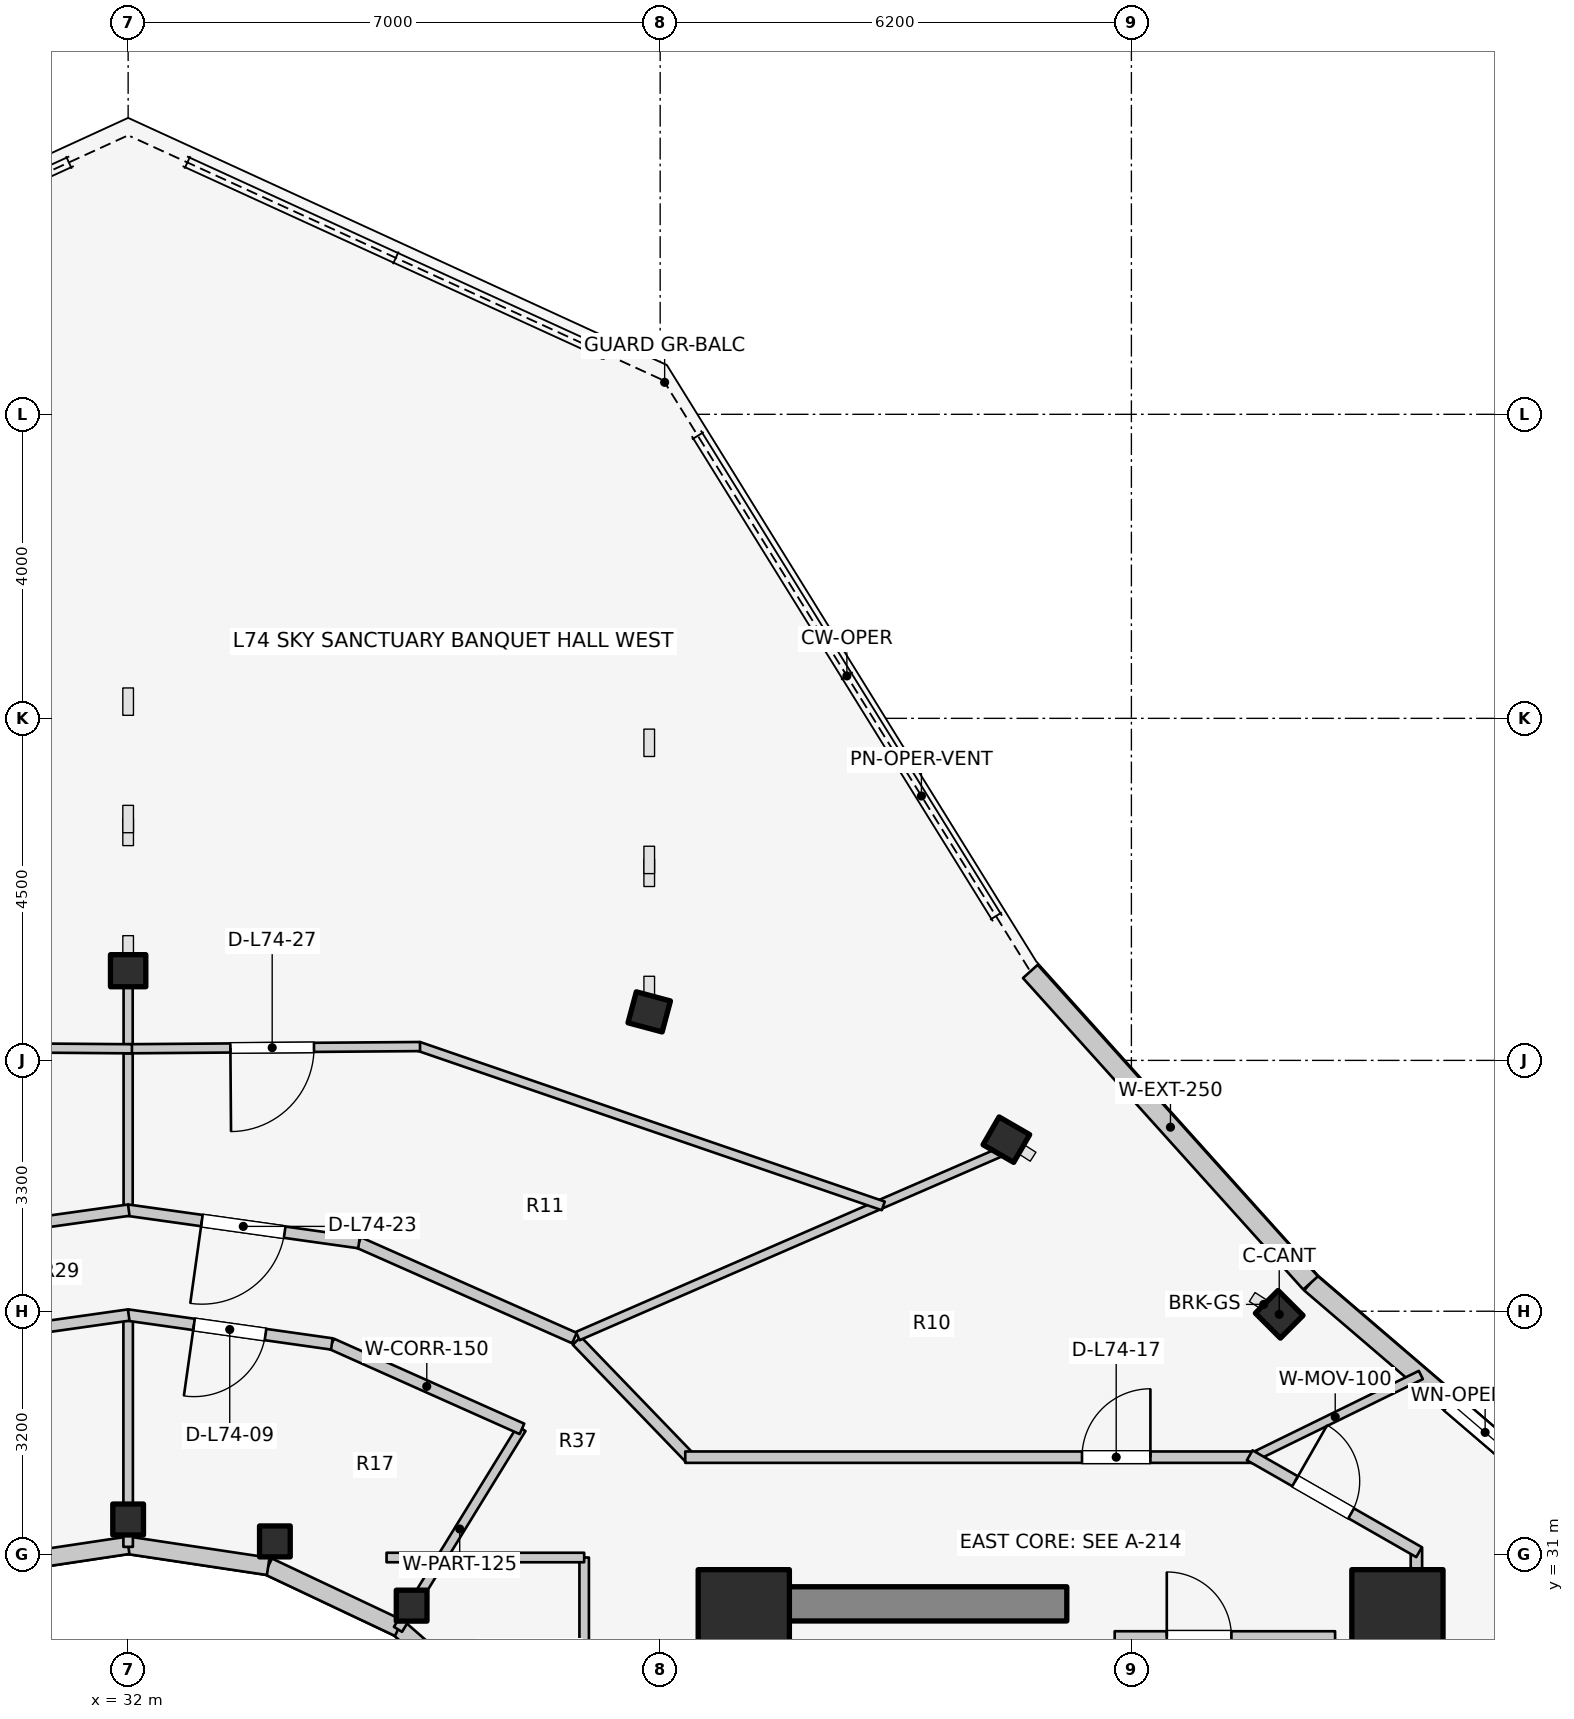
"""IFC4 building model, lengths in metres.
Left out: names, types, materials, properties, quantities, classifications, styles, units other than length and angle.
Written with IfcOpenShell. Run it as: python <this file> out.ifc"""

import sys

from ifc_helpers import new_model, si_unit, direction, frame, frame_2d, origin, origin_2d, place, context, subcontext, project, spatial, rectangle, i_section, extrude, element, fill, save


model = new_model("IFC4")
c1 = context("Model", 3, precision=1e-05, world=origin(), true_north=direction((0.0, 1.0)))
c2 = subcontext(c1, "Body", "Model", "MODEL_VIEW")
j1 = project(units=[si_unit("LENGTHUNIT", "METRE"), si_unit("PLANEANGLEUNIT", "RADIAN")], contexts=[c1])
p1 = place(None, origin())
s1 = spatial("IfcSite", under=j1, at=p1, CompositionType="ELEMENT")
p2 = place(p1, origin())
s2 = spatial("IfcBuilding", under=s1, at=p2, CompositionType="ELEMENT")
p3 = place(p2, frame((0.0, 0.0, 242.4)))
s3 = spatial("IfcBuildingStorey", under=s2, at=p3, CompositionType="ELEMENT", Elevation=242.4)
p4 = place(p3, frame((39.85, 30.35, 0.0), z_axis=(0.0, 0.0, 1.0), x_axis=(1.0, 0.0, 0.0)))
e1 = element("IfcWall", 1, at=p4, inside=s3, PredefinedType="SHEAR", context=c2, shape_type="SweptSolid", body=[
    extrude(rectangle(XDim=4.5, YDim=0.45, at=frame_2d((2.25, 0.0))), origin(), (0.0, 0.0, 1.0), 3.6),
])
for number, where, z_axis, x_axis in (
    (2, (48.7, 30.2, 0.0), (0.0, 0.0, 1.0), (1.0, 0.0, 0.0)),
    (3, (40.1, 30.2, 0.0), (0.0, 0.0, 1.0), (1.0, 0.0, 0.0)),
):
    element("IfcColumn", number, at=place(p3, frame(where, z_axis=z_axis, x_axis=x_axis)), inside=s3, PredefinedType="COLUMN", context=c2, shape_type="SweptSolid", body=[
        extrude(rectangle(XDim=1.2, YDim=1.2, at=origin_2d()), origin(), (0.0, 0.0, 1.0), 3.6),
    ])
p5 = place(p3, frame((47.145, 34.159, 0.0), z_axis=(0.0, 0.0, 1.0), x_axis=(0.707106781187, 0.707106781187, 0.0)))
e4 = element("IfcColumn", 4, at=p5, inside=s3, PredefinedType="COLUMN", context=c2, shape_type="SweptSolid", body=[
    extrude(i_section(OverallWidth=0.422, OverallDepth=0.465, WebThickness=0.045, FlangeThickness=0.073, FilletRadius=0.025, at=origin_2d()), origin(), (0.0, 0.0, 1.0), 3.6),
])
p6 = place(p3, frame((35.73, 30.327, 0.0), z_axis=(0.0, 0.0, 1.0), x_axis=(1.0, 0.0, 0.0)))
e5 = element("IfcColumn", 5, at=p6, inside=s3, PredefinedType="COLUMN", context=c2, shape_type="SweptSolid", body=[
    extrude(i_section(OverallWidth=0.404, OverallDepth=0.407, WebThickness=0.027, FlangeThickness=0.044, FilletRadius=0.025, at=origin_2d()), origin(), (0.0, 0.0, 1.0), 3.6),
])
p7 = place(p3, frame((43.555, 36.457, 0.0), z_axis=(0.0, 0.0, 1.0), x_axis=(0.5, 0.866025403784, 0.0)))
e6 = element("IfcColumn", 6, at=p7, inside=s3, PredefinedType="COLUMN", context=c2, shape_type="SweptSolid", body=[
    extrude(i_section(OverallWidth=0.422, OverallDepth=0.465, WebThickness=0.045, FlangeThickness=0.073, FilletRadius=0.025, at=origin_2d()), origin(), (0.0, 0.0, 1.0), 3.6),
])
p8 = place(p3, frame((33.931, 31.172, 0.0), z_axis=(0.0, 0.0, 1.0), x_axis=(1.0, 0.0, 0.0)))
e7 = element("IfcColumn", 7, at=p8, inside=s3, PredefinedType="COLUMN", context=c2, shape_type="SweptSolid", body=[
    extrude(i_section(OverallWidth=0.404, OverallDepth=0.407, WebThickness=0.027, FlangeThickness=0.044, FilletRadius=0.025, at=origin_2d()), origin(), (0.0, 0.0, 1.0), 3.6),
])
p9 = place(p3, frame((38.856, 38.138, 0.0), z_axis=(0.0, 0.0, 1.0), x_axis=(0.258819045103, 0.965925826289, 0.0)))
e8 = element("IfcColumn", 8, at=p9, inside=s3, PredefinedType="COLUMN", context=c2, shape_type="SweptSolid", body=[
    extrude(i_section(OverallWidth=0.422, OverallDepth=0.465, WebThickness=0.045, FlangeThickness=0.073, FilletRadius=0.025, at=origin_2d()), origin(), (0.0, 0.0, 1.0), 3.6),
])
p10 = place(p3, frame((32.0, 31.46, 0.0), z_axis=(0.0, 0.0, 1.0), x_axis=(1.0, 0.0, 0.0)))
e9 = element("IfcColumn", 9, at=p10, inside=s3, PredefinedType="COLUMN", context=c2, shape_type="SweptSolid", body=[
    extrude(i_section(OverallWidth=0.404, OverallDepth=0.407, WebThickness=0.027, FlangeThickness=0.044, FilletRadius=0.025, at=origin_2d()), origin(), (0.0, 0.0, 1.0), 3.6),
])
p11 = place(p3, frame((32.0, 38.68, 0.0), z_axis=(0.0, 0.0, 1.0), x_axis=(0.0, 1.0, 0.0)))
e10 = element("IfcColumn", 10, at=p11, inside=s3, PredefinedType="COLUMN", context=c2, shape_type="SweptSolid", body=[
    extrude(i_section(OverallWidth=0.422, OverallDepth=0.465, WebThickness=0.045, FlangeThickness=0.073, FilletRadius=0.025, at=origin_2d()), origin(), (0.0, 0.0, 1.0), 3.6),
])
p12 = place(p3, frame((37.035, 28.742, 0.0), z_axis=(0.0, 0.0, 1.0), x_axis=(-0.752576694707, 0.658504607869, 0.0)))
e11 = element("IfcWall", 11, at=p12, inside=s3, PredefinedType="STANDARD", context=c2, shape_type="SweptSolid", body=[
    extrude(rectangle(XDim=1.959, YDim=0.23, at=frame_2d((0.98, 0.0))), origin(), (0.0, 0.0, 1.0), 2.6),
])
p13 = place(p3, frame((35.56, 30.032, 0.0), z_axis=(0.0, 0.0, 1.0), x_axis=(-0.904179699603, 0.427152280606, 0.0)))
e12 = element("IfcWall", 12, at=p13, inside=s3, PredefinedType="STANDARD", context=c2, shape_type="SweptSolid", body=[
    extrude(rectangle(XDim=1.899, YDim=0.23, at=frame_2d((0.95, 0.0))), origin(), (0.0, 0.0, 1.0), 2.6),
])
for number, where, z_axis, x_axis in (
    (13, (33.843, 30.843, 0.0), (0.0, 0.0, 1.0), (-0.989, 0.149, 0.0)),
    (14, (32.0, 31.12, 0.0), (0.0, 0.0, 1.0), (-0.989, -0.149, 0.0)),
):
    element("IfcWall", number, at=place(p3, frame(where, z_axis=z_axis, x_axis=x_axis)), inside=s3, PredefinedType="STANDARD", context=c2, shape_type="SweptSolid", body=[
        extrude(rectangle(XDim=1.864, YDim=0.23, at=frame_2d((0.932, 0.0))), origin(), (0.0, 0.0, 1.0), 2.6),
    ])
p14 = place(p3, frame((50.761, 31.829, 0.0), z_axis=(0.0, 0.0, 1.0), x_axis=(-0.759587504333, 0.650405122413, 0.0)))
e15 = element("IfcWall", 15, at=p14, inside=s3, PredefinedType="STANDARD", context=c2, shape_type="SweptSolid", body=[
    extrude(rectangle(XDim=4.217, YDim=0.26, at=frame_2d((2.109, 0.0))), origin(), (0.0, 0.0, 1.0), 3.29),
])
p15 = place(p14, frame((0.594, 0.0, 0.75)))
e16 = element("IfcOpeningElement", 16, at=p15, cuts=e15, PredefinedType="OPENING", context=c2, shape_type="SweptSolid", body=[
    extrude(rectangle(XDim=1.2, YDim=1.5, at=frame_2d((0.6, 0.75))), frame((0.0, 0.14, 0.0), z_axis=(0.0, -1.0, 0.0), x_axis=(1.0, 0.0, 0.0)), (0.0, 0.0, 1.0), 0.28),
])
p16 = place(p3, frame((47.558, 34.572, 0.0), z_axis=(0.0, 0.0, 1.0), x_axis=(-0.668903560134, 0.743349196031, 0.0)))
e17 = element("IfcWall", 17, at=p16, inside=s3, PredefinedType="STANDARD", context=c2, shape_type="SweptSolid", body=[
    extrude(rectangle(XDim=5.513, YDim=0.26, at=frame_2d((2.756, 0.0))), origin(), (0.0, 0.0, 1.0), 3.29),
])
p17 = place(p3, frame((44.98, 29.92, 0.0), z_axis=(0.0, 0.0, 1.0), x_axis=(1.0, 0.0, 0.0)))
e18 = element("IfcWall", 18, at=p17, inside=s3, PredefinedType="PLUMBINGWALL", context=c2, shape_type="SweptSolid", body=[
    extrude(rectangle(XDim=2.9, YDim=0.14, at=frame_2d((1.45, 0.0))), origin(), (0.0, 0.0, 1.0), 3.295),
])
p18 = place(p17, frame((0.686, 0.0, 0.0)))
e19 = element("IfcOpeningElement", 19, at=p18, cuts=e18, PredefinedType="OPENING", context=c2, shape_type="SweptSolid", body=[
    extrude(rectangle(XDim=0.85, YDim=2.05, at=frame_2d((0.425, 1.025))), frame((0.0, 0.08, 0.0), z_axis=(0.0, -1.0, 0.0), x_axis=(1.0, 0.0, 0.0)), (0.0, 0.0, 1.0), 0.16),
])
p19 = place(p3, frame((35.55, 30.015, 0.0), z_axis=(0.0, 0.0, 1.0), x_axis=(0.523992004803, 0.851723182086, 0.0)))
e20 = element("IfcWall", 20, at=p19, inside=s3, PredefinedType="PARTITIONING", context=c2, shape_type="SweptSolid", body=[
    extrude(rectangle(XDim=3.101, YDim=0.125, at=frame_2d((1.551, 0.0))), origin(), (0.0, 0.0, 1.0), 2.672),
])
p20 = place(p3, frame((32.0, 31.1, 0.0), z_axis=(0.0, 0.0, 1.0), x_axis=(0.0, 1.0, 0.0)))
e21 = element("IfcWall", 21, at=p20, inside=s3, PredefinedType="PARTITIONING", context=c2, shape_type="SweptSolid", body=[
    extrude(rectangle(XDim=3.05, YDim=0.125, at=frame_2d((1.525, 0.0))), origin(), (0.0, 0.0, 1.0), 2.672),
])
p21 = place(p3, frame((37.181, 32.652, 0.0), z_axis=(0.0, 0.0, 1.0), x_axis=(-0.913120130558, 0.407690602257, 0.0)))
e22 = element("IfcWall", 22, at=p21, inside=s3, PredefinedType="PARTITIONING", context=c2, shape_type="SweptSolid", body=[
    extrude(rectangle(XDim=2.743, YDim=0.15, at=frame_2d((1.371, 0.0))), origin(), (0.0, 0.0, 1.0), 2.823),
])
p22 = place(p3, frame((34.68, 33.77, 0.0), z_axis=(0.0, 0.0, 1.0), x_axis=(-0.990132151456, 0.140136799779, 0.0)))
e23 = element("IfcWall", 23, at=p22, inside=s3, PredefinedType="PARTITIONING", context=c2, shape_type="SweptSolid", body=[
    extrude(rectangle(XDim=2.714, YDim=0.15, at=frame_2d((1.357, 0.0))), origin(), (0.0, 0.0, 1.0), 2.823),
])
p23 = place(p22, frame((0.882, 0.0, 0.0)))
e24 = element("IfcOpeningElement", 24, at=p23, cuts=e23, PredefinedType="OPENING", context=c2, shape_type="SweptSolid", body=[
    extrude(rectangle(XDim=0.95, YDim=2.1, at=frame_2d((0.475, 1.05))), frame((0.0, 0.085, 0.0), z_axis=(0.0, -1.0, 0.0), x_axis=(1.0, 0.0, 0.0)), (0.0, 0.0, 1.0), 0.17),
])
p24 = place(p3, frame((32.007, 34.15, 0.0), z_axis=(0.0, 0.0, 1.0), x_axis=(-0.990132151456, -0.140136799779, 0.0)))
e25 = element("IfcWall", 25, at=p24, inside=s3, PredefinedType="PARTITIONING", context=c2, shape_type="SweptSolid", body=[
    extrude(rectangle(XDim=2.714, YDim=0.15, at=frame_2d((1.357, 0.0))), origin(), (0.0, 0.0, 1.0), 2.823),
])
p25 = place(p3, frame((38.0, 25.8, 0.0), z_axis=(0.0, 0.0, 1.0), x_axis=(0.0, 1.0, 0.0)))
e26 = element("IfcWall", 26, at=p25, inside=s3, PredefinedType="PARTITIONING", context=c2, shape_type="SweptSolid", body=[
    extrude(rectangle(XDim=5.16, YDim=0.125, at=frame_2d((2.58, 0.0))), origin(), (0.0, 0.0, 1.0), 2.672),
])
p26 = place(p3, frame((35.4, 30.96, 0.0), z_axis=(0.0, 0.0, 1.0), x_axis=(1.0, 0.0, 0.0)))
e27 = element("IfcWall", 27, at=p26, inside=s3, PredefinedType="PARTITIONING", context=c2, shape_type="SweptSolid", body=[
    extrude(rectangle(XDim=2.6, YDim=0.125, at=frame_2d((1.3, 0.0))), origin(), (0.0, 0.0, 1.0), 2.816),
])
p27 = place(p3, frame((48.95, 29.8, 0.0), z_axis=(0.0, 0.0, 1.0), x_axis=(0.0, 1.0, 0.0)))
e28 = element("IfcWall", 28, at=p27, inside=s3, PredefinedType="PARTITIONING", context=c2, shape_type="SweptSolid", body=[
    extrude(rectangle(XDim=1.29, YDim=0.15, at=frame_2d((0.645, 0.0))), origin(), (0.0, 0.0, 1.0), 3.295),
])
p28 = place(p3, frame((46.755, 32.258, 0.0), z_axis=(0.0, 0.0, 1.0), x_axis=(0.898152129572, 0.439684832745, 0.0)))
e29 = element("IfcWall", 29, at=p28, inside=s3, PredefinedType="MOVABLE", context=c2, shape_type="SweptSolid", body=[
    extrude(rectangle(XDim=2.509, YDim=0.12, at=frame_2d((1.254, 0.0))), origin(), (0.0, 0.0, 1.0), 2.66),
])
p29 = place(p3, frame((37.903, 33.812, 0.0), z_axis=(0.0, 0.0, 1.0), x_axis=(0.694032962553, -0.719943224768, 0.0)))
e30 = element("IfcWall", 30, at=p29, inside=s3, PredefinedType="PARTITIONING", context=c2, shape_type="SweptSolid", body=[
    extrude(rectangle(XDim=2.158, YDim=0.15, at=frame_2d((1.079, 0.0))), origin(), (0.0, 0.0, 1.0), 2.816),
])
p30 = place(p3, frame((39.33, 32.28, 0.0), z_axis=(0.0, 0.0, 1.0), x_axis=(1.0, 0.0, 0.0)))
e31 = element("IfcWall", 31, at=p30, inside=s3, PredefinedType="PARTITIONING", context=c2, shape_type="SweptSolid", body=[
    extrude(rectangle(XDim=7.52, YDim=0.15, at=frame_2d((3.76, 0.0))), origin(), (0.0, 0.0, 1.0), 2.816),
])
p31 = place(p30, frame((5.22, 0.0, 0.0)))
e32 = element("IfcOpeningElement", 32, at=p31, cuts=e31, PredefinedType="OPENING", context=c2, shape_type="SweptSolid", body=[
    extrude(rectangle(XDim=0.9, YDim=2.1, at=frame_2d((0.45, 1.05))), frame((0.0, 0.085, 0.0), z_axis=(0.0, -1.0, 0.0), x_axis=(1.0, 0.0, 0.0)), (0.0, 0.0, 1.0), 0.17),
])
p32 = place(p3, frame((46.757, 32.305, 0.0), z_axis=(0.0, 0.0, 1.0), x_axis=(0.867991349648, -0.496579315857, 0.0)))
e33 = element("IfcWall", 33, at=p32, inside=s3, PredefinedType="PARTITIONING", context=c2, shape_type="SweptSolid", body=[
    extrude(rectangle(XDim=2.567, YDim=0.15, at=frame_2d((1.283, 0.0))), origin(), (0.0, 0.0, 1.0), 2.66),
])
p33 = place(p32, frame((0.688, 0.0, 0.0)))
e34 = element("IfcOpeningElement", 34, at=p33, cuts=e33, PredefinedType="OPENING", context=c2, shape_type="SweptSolid", body=[
    extrude(rectangle(XDim=0.85, YDim=2.05, at=frame_2d((0.425, 1.025))), frame((0.0, 0.085, 0.0), z_axis=(0.0, -1.0, 0.0), x_axis=(1.0, 0.0, 0.0)), (0.0, 0.0, 1.0), 0.17),
])
p34 = place(p3, frame((37.915, 33.873, 0.0), z_axis=(0.0, 0.0, 1.0), x_axis=(0.916946661839, 0.399009798554, 0.0)))
e35 = element("IfcWall", 35, at=p34, inside=s3, PredefinedType="MOVABLE", context=c2, shape_type="SweptSolid", body=[
    extrude(rectangle(XDim=6.042, YDim=0.12, at=frame_2d((3.021, 0.0))), origin(), (0.0, 0.0, 1.0), 2.66),
])
p35 = place(p3, frame((32.0, 35.585, 0.0), z_axis=(0.0, 0.0, 1.0), x_axis=(0.0, 1.0, 0.0)))
e36 = element("IfcWall", 36, at=p35, inside=s3, PredefinedType="MOVABLE", context=c2, shape_type="SweptSolid", body=[
    extrude(rectangle(XDim=2.895, YDim=0.12, at=frame_2d((1.448, 0.0))), origin(), (0.0, 0.0, 1.0), 2.66),
])
p36 = place(p3, frame((37.872, 33.847, 0.0), z_axis=(0.0, 0.0, 1.0), x_axis=(-0.914384748819, 0.404846305563, 0.0)))
e37 = element("IfcWall", 37, at=p36, inside=s3, PredefinedType="PARTITIONING", context=c2, shape_type="SweptSolid", body=[
    extrude(rectangle(XDim=3.104, YDim=0.15, at=frame_2d((1.552, 0.0))), origin(), (0.0, 0.0, 1.0), 2.823),
])
p37 = place(p3, frame((35.038, 35.103, 0.0), z_axis=(0.0, 0.0, 1.0), x_axis=(-0.990295701983, 0.138976338396, 0.0)))
e38 = element("IfcWall", 38, at=p37, inside=s3, PredefinedType="PARTITIONING", context=c2, shape_type="SweptSolid", body=[
    extrude(rectangle(XDim=3.076, YDim=0.15, at=frame_2d((1.538, 0.0))), origin(), (0.0, 0.0, 1.0), 2.823),
])
p38 = place(p37, frame((0.988, 0.0, 0.0)))
e39 = element("IfcOpeningElement", 39, at=p38, cuts=e38, PredefinedType="OPENING", context=c2, shape_type="SweptSolid", body=[
    extrude(rectangle(XDim=1.1, YDim=2.1, at=frame_2d((0.55, 1.05))), frame((0.0, 0.085, 0.0), z_axis=(0.0, -1.0, 0.0), x_axis=(1.0, 0.0, 0.0)), (0.0, 0.0, 1.0), 0.17),
])
p39 = place(p3, frame((32.008, 35.53, 0.0), z_axis=(0.0, 0.0, 1.0), x_axis=(-0.990295701983, -0.138976338396, 0.0)))
e40 = element("IfcWall", 40, at=p39, inside=s3, PredefinedType="PARTITIONING", context=c2, shape_type="SweptSolid", body=[
    extrude(rectangle(XDim=3.076, YDim=0.15, at=frame_2d((1.538, 0.0))), origin(), (0.0, 0.0, 1.0), 2.823),
])
p40 = place(p3, frame((41.935, 35.586, 0.0), z_axis=(0.0, 0.0, 1.0), x_axis=(-0.945789589552, 0.324780005995, 0.0)))
e41 = element("IfcWall", 41, at=p40, inside=s3, PredefinedType="MOVABLE", context=c2, shape_type="SweptSolid", body=[
    extrude(rectangle(XDim=6.465, YDim=0.12, at=frame_2d((3.232, 0.0))), origin(), (0.0, 0.0, 1.0), 2.823),
])
p41 = place(p3, frame((35.841, 37.682, 0.0), z_axis=(0.0, 0.0, 1.0), x_axis=(-0.999971175398, -0.007592652624, 0.0)))
e42 = element("IfcWall", 42, at=p41, inside=s3, PredefinedType="MOVABLE", context=c2, shape_type="SweptSolid", body=[
    extrude(rectangle(XDim=3.891, YDim=0.12, at=frame_2d((1.945, 0.0))), origin(), (0.0, 0.0, 1.0), 2.823),
])
p42 = place(p41, frame((1.395, 0.0, 0.0)))
e43 = element("IfcOpeningElement", 43, at=p42, cuts=e42, PredefinedType="OPENING", context=c2, shape_type="SweptSolid", body=[
    extrude(rectangle(XDim=1.1, YDim=2.1, at=frame_2d((0.55, 1.05))), frame((0.0, 0.07, 0.0), z_axis=(0.0, -1.0, 0.0), x_axis=(1.0, 0.0, 0.0)), (0.0, 0.0, 1.0), 0.14),
])
p43 = place(p3, frame((32.05, 37.653, 0.0), z_axis=(0.0, 0.0, 1.0), x_axis=(-0.999971175398, 0.007592652624, 0.0)))
e44 = element("IfcWall", 44, at=p43, inside=s3, PredefinedType="MOVABLE", context=c2, shape_type="SweptSolid", body=[
    extrude(rectangle(XDim=3.891, YDim=0.12, at=frame_2d((1.945, 0.0))), origin(), (0.0, 0.0, 1.0), 2.823),
])
p44 = place(p15, origin())
e45 = element("IfcWindow", 45, at=p44, inside=s3, PartitioningType="SINGLE_PANEL", PredefinedType="WINDOW", context=c2, shape_type="SweptSolid", body=[
    extrude(rectangle(XDim=1.2, YDim=1.5, at=frame_2d((0.6, 0.75))), frame((0.0, 0.03, 0.0), z_axis=(0.0, -1.0, 0.0), x_axis=(1.0, 0.0, 0.0)), (0.0, 0.0, 1.0), 0.06),
])
fill(e16, e45)
p45 = place(p18, origin())
e46 = element("IfcDoor", 46, at=p45, inside=s3, OperationType="SINGLE_SWING_LEFT", PredefinedType="DOOR", context=c2, shape_type="SweptSolid", body=[
    extrude(rectangle(XDim=0.85, YDim=2.05, at=frame_2d((0.425, 1.025))), frame((0.0, 0.025, 0.0), z_axis=(0.0, -1.0, 0.0), x_axis=(1.0, 0.0, 0.0)), (0.0, 0.0, 1.0), 0.05),
])
fill(e19, e46)
p46 = place(p23, origin())
e47 = element("IfcDoor", 47, at=p46, inside=s3, OperationType="SINGLE_SWING_RIGHT", PredefinedType="DOOR", context=c2, shape_type="SweptSolid", body=[
    extrude(rectangle(XDim=0.95, YDim=2.1, at=frame_2d((0.475, 1.05))), frame((0.0, 0.025, 0.0), z_axis=(0.0, -1.0, 0.0), x_axis=(1.0, 0.0, 0.0)), (0.0, 0.0, 1.0), 0.05),
])
fill(e24, e47)
p47 = place(p31, origin())
e48 = element("IfcDoor", 48, at=p47, inside=s3, OperationType="SINGLE_SWING_RIGHT", PredefinedType="DOOR", context=c2, shape_type="SweptSolid", body=[
    extrude(rectangle(XDim=0.9, YDim=2.1, at=frame_2d((0.45, 1.05))), frame((0.0, 0.025, 0.0), z_axis=(0.0, -1.0, 0.0), x_axis=(1.0, 0.0, 0.0)), (0.0, 0.0, 1.0), 0.05),
])
fill(e32, e48)
p48 = place(p33, origin())
e49 = element("IfcDoor", 49, at=p48, inside=s3, OperationType="SINGLE_SWING_LEFT", PredefinedType="DOOR", context=c2, shape_type="SweptSolid", body=[
    extrude(rectangle(XDim=0.85, YDim=2.05, at=frame_2d((0.425, 1.025))), frame((0.0, 0.025, 0.0), z_axis=(0.0, -1.0, 0.0), x_axis=(1.0, 0.0, 0.0)), (0.0, 0.0, 1.0), 0.05),
])
fill(e34, e49)
p49 = place(p38, origin())
e50 = element("IfcDoor", 50, at=p49, inside=s3, OperationType="SINGLE_SWING_RIGHT", PredefinedType="DOOR", context=c2, shape_type="SweptSolid", body=[
    extrude(rectangle(XDim=1.1, YDim=2.1, at=frame_2d((0.55, 1.05))), frame((0.0, 0.025, 0.0), z_axis=(0.0, -1.0, 0.0), x_axis=(1.0, 0.0, 0.0)), (0.0, 0.0, 1.0), 0.05),
])
fill(e39, e50)
p50 = place(p42, origin())
e51 = element("IfcDoor", 51, at=p50, inside=s3, OperationType="SINGLE_SWING_RIGHT", PredefinedType="DOOR", context=c2, shape_type="SweptSolid", body=[
    extrude(rectangle(XDim=1.1, YDim=2.1, at=frame_2d((0.55, 1.05))), frame((0.0, 0.025, 0.0), z_axis=(0.0, -1.0, 0.0), x_axis=(1.0, 0.0, 0.0)), (0.0, 0.0, 1.0), 0.05),
])
fill(e43, e51)
save(model, sys.argv[1])
